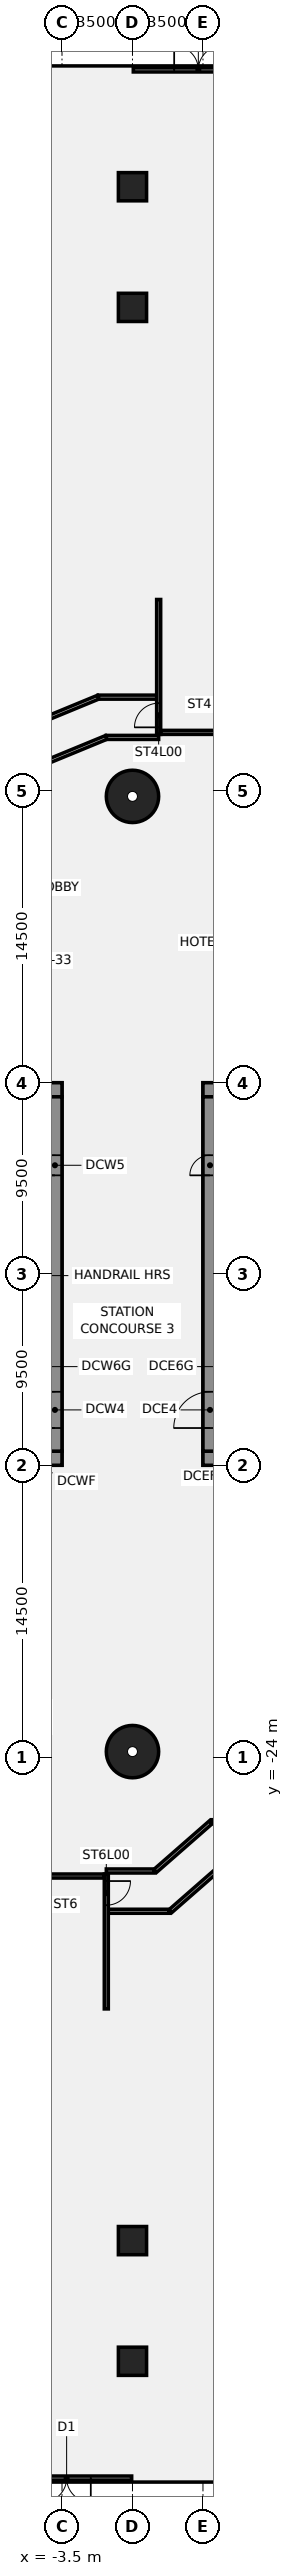
"""IFC4 building model, lengths in metres.
Left out: names, types, materials, properties, quantities, classifications, styles, units other than length and angle.
Written with IfcOpenShell. Run it as: python <this file> out.ifc"""

import sys

from ifc_helpers import new_model, si_unit, direction, frame, frame_2d, origin, origin_2d, place, context, subcontext, project, spatial, polyline, rectangle, circle, outline, extrude, element, fill, save


model = new_model("IFC4")
c1 = context("Model", 3, precision=1e-05, world=origin(), true_north=direction((0.0, 1.0)))
c2 = subcontext(c1, "Body", "Model", "MODEL_VIEW")
j1 = project(units=[si_unit("LENGTHUNIT", "METRE"), si_unit("PLANEANGLEUNIT", "RADIAN")], contexts=[c1])
p1 = place(None, origin())
s1 = spatial("IfcSite", under=j1, at=p1, CompositionType="ELEMENT")
p2 = place(p1, origin())
s2 = spatial("IfcBuilding", under=s1, at=p2, CompositionType="ELEMENT")
p3 = place(p2, origin())
s3 = spatial("IfcBuildingStorey", under=s2, at=p3, CompositionType="ELEMENT", Elevation=0.0)
for number, where, z_axis, x_axis in (
    (1, (0.0, 23.721, -0.55), (0.0, 0.0, 1.0), (1.0, 0.0, 0.0)),
    (2, (0.0, -23.721, -0.55), (0.0, 0.0, 1.0), (1.0, 0.0, 0.0)),
):
    element("IfcColumn", number, at=place(p3, frame(where, z_axis=z_axis, x_axis=x_axis)), inside=s3, PredefinedType="COLUMN", context=c2, shape_type="SweptSolid", body=[
        extrude(circle(Radius=1.3, at=origin_2d()), origin(), (0.0, 0.0, 1.0), 9.05),
    ])
for number, where, z_axis, x_axis in (
    (3, (0.0, 48.008, -0.55), (0.0, 0.0, 1.0), (1.0, 0.0, 0.0)),
    (4, (0.0, -48.008, -0.55), (0.0, 0.0, 1.0), (1.0, 0.0, 0.0)),
    (5, (0.0, -54.0, -0.55), (0.0, 0.0, 1.0), (1.0, 0.0, 0.0)),
    (6, (0.0, 54.0, -0.55), (0.0, 0.0, 1.0), (1.0, 0.0, 0.0)),
):
    element("IfcColumn", number, at=place(p3, frame(where, z_axis=z_axis, x_axis=x_axis)), inside=s3, PredefinedType="COLUMN", context=c2, shape_type="SweptSolid", body=[
        extrude(rectangle(XDim=1.4, YDim=1.4, at=origin_2d()), origin(), (0.0, 0.0, 1.0), 9.05),
    ])
p4 = place(p3, frame((1.3, 26.65, 0.0), z_axis=(0.0, 0.0, 1.0), x_axis=(-1.0, 0.0, 0.0)))
e7 = element("IfcWall", 7, at=p4, inside=s3, PredefinedType="PARTITIONING", context=c2, shape_type="SweptSolid", body=[
    extrude(rectangle(XDim=2.602, YDim=0.2, at=frame_2d((1.301, 0.0))), origin(), (0.0, 0.0, 1.0), 8.5),
])
p5 = place(p3, frame((-1.302, 26.65, 0.0), z_axis=(0.0, 0.0, 1.0), x_axis=(-0.92451250122, -0.381151721874, 0.0)))
e8 = element("IfcWall", 8, at=p5, inside=s3, PredefinedType="PARTITIONING", context=c2, shape_type="SweptSolid", body=[
    extrude(rectangle(XDim=6.171, YDim=0.2, at=frame_2d((3.085, 0.0))), origin(), (0.0, 0.0, 1.0), 8.5),
])
p6 = place(p3, frame((1.3, 28.65, 0.0), z_axis=(0.0, 0.0, 1.0), x_axis=(-1.0, 0.0, 0.0)))
e9 = element("IfcWall", 9, at=p6, inside=s3, PredefinedType="PARTITIONING", context=c2, shape_type="SweptSolid", body=[
    extrude(rectangle(XDim=2.998, YDim=0.2, at=frame_2d((1.499, 0.0))), origin(), (0.0, 0.0, 1.0), 8.5),
])
p7 = place(p3, frame((-1.698, 28.65, 0.0), z_axis=(0.0, 0.0, 1.0), x_axis=(-0.924522061362, -0.381128532198, 0.0)))
e10 = element("IfcWall", 10, at=p7, inside=s3, PredefinedType="PARTITIONING", context=c2, shape_type="SweptSolid", body=[
    extrude(rectangle(XDim=6.16, YDim=0.2, at=frame_2d((3.08, 0.0))), origin(), (0.0, 0.0, 1.0), 8.5),
])
p8 = place(p3, frame((-1.3, -29.65, 0.0), z_axis=(0.0, 0.0, 1.0), x_axis=(1.0, 0.0, 0.0)))
e11 = element("IfcWall", 11, at=p8, inside=s3, PredefinedType="PARTITIONING", context=c2, shape_type="SweptSolid", body=[
    extrude(rectangle(XDim=2.374, YDim=0.2, at=frame_2d((1.187, 0.0))), origin(), (0.0, 0.0, 1.0), 8.5),
])
p9 = place(p3, frame((1.124, -29.65, 0.0), z_axis=(0.0, 0.0, 1.0), x_axis=(0.752593197415, 0.658485747154, 0.0)))
e12 = element("IfcWall", 12, at=p9, inside=s3, PredefinedType="PARTITIONING", context=c2, shape_type="SweptSolid", body=[
    extrude(rectangle(XDim=3.666, YDim=0.2, at=frame_2d((1.833, 0.0))), origin(), (0.0, 0.0, 1.0), 8.5),
])
p10 = place(p3, frame((3.921, -27.203, 0.0), z_axis=(0.0, 0.0, 1.0), x_axis=(0.999965985762, 0.008247867521, 0.0)))
e13 = element("IfcWall", 13, at=p10, inside=s3, PredefinedType="PARTITIONING", context=c2, shape_type="SweptSolid", body=[
    extrude(rectangle(XDim=12.491, YDim=0.2, at=frame_2d((6.246, 0.0))), origin(), (0.0, 0.0, 1.0), 8.5),
])
p11 = place(p3, frame((-1.3, -31.65, 0.0), z_axis=(0.0, 0.0, 1.0), x_axis=(1.0, 0.0, 0.0)))
e14 = element("IfcWall", 14, at=p11, inside=s3, PredefinedType="PARTITIONING", context=c2, shape_type="SweptSolid", body=[
    extrude(rectangle(XDim=3.126, YDim=0.2, at=frame_2d((1.563, 0.0))), origin(), (0.0, 0.0, 1.0), 8.5),
])
p12 = place(p3, frame((1.876, -31.65, 0.0), z_axis=(0.0, 0.0, 1.0), x_axis=(0.75257257963, 0.658509310784, 0.0)))
e15 = element("IfcWall", 15, at=p12, inside=s3, PredefinedType="PARTITIONING", context=c2, shape_type="SweptSolid", body=[
    extrude(rectangle(XDim=3.675, YDim=0.2, at=frame_2d((1.838, 0.0))), origin(), (0.0, 0.0, 1.0), 8.5),
])
p13 = place(p3, frame((9.101, 59.8, 0.0), z_axis=(0.0, 0.0, 1.0), x_axis=(-1.0, 0.0, 0.0)))
e16 = element("IfcWall", 16, at=p13, inside=s3, PredefinedType="SOLIDWALL", context=c2, shape_type="SweptSolid", body=[
    extrude(rectangle(XDim=9.061, YDim=0.2, at=frame_2d((4.53, 0.0))), origin(), (0.0, 0.0, 1.0), 2.9),
])
p14 = place(p13, frame((2.03, 0.0, 0.0)))
e17 = element("IfcOpeningElement", 17, at=p14, cuts=e16, PredefinedType="OPENING", context=c2, shape_type="SweptSolid", body=[
    extrude(rectangle(XDim=2.4, YDim=2.4, at=frame_2d((1.2, 1.2))), frame((0.0, 0.11, 0.0), z_axis=(0.0, -1.0, 0.0), x_axis=(1.0, 0.0, 0.0)), (0.0, 0.0, 1.0), 0.22),
])
p15 = place(p13, frame((4.63, 0.0, 0.0)))
e18 = element("IfcOpeningElement", 18, at=p15, cuts=e16, PredefinedType="OPENING", context=c2, shape_type="SweptSolid", body=[
    extrude(rectangle(XDim=2.4, YDim=2.4, at=frame_2d((1.2, 1.2))), frame((0.0, 0.11, 0.0), z_axis=(0.0, -1.0, 0.0), x_axis=(1.0, 0.0, 0.0)), (0.0, 0.0, 1.0), 0.22),
])
p16 = place(p3, frame((-9.101, -59.8, 0.0), z_axis=(0.0, 0.0, 1.0), x_axis=(1.0, 0.0, 0.0)))
e19 = element("IfcWall", 19, at=p16, inside=s3, PredefinedType="SOLIDWALL", context=c2, shape_type="SweptSolid", body=[
    extrude(rectangle(XDim=9.061, YDim=0.2, at=frame_2d((4.53, 0.0))), origin(), (0.0, 0.0, 1.0), 2.9),
])
p17 = place(p16, frame((2.03, 0.0, 0.0)))
e20 = element("IfcOpeningElement", 20, at=p17, cuts=e19, PredefinedType="OPENING", context=c2, shape_type="SweptSolid", body=[
    extrude(rectangle(XDim=2.4, YDim=2.4, at=frame_2d((1.2, 1.2))), frame((0.0, 0.11, 0.0), z_axis=(0.0, -1.0, 0.0), x_axis=(1.0, 0.0, 0.0)), (0.0, 0.0, 1.0), 0.22),
])
p18 = place(p16, frame((4.63, 0.0, 0.0)))
e21 = element("IfcOpeningElement", 21, at=p18, cuts=e19, PredefinedType="OPENING", context=c2, shape_type="SweptSolid", body=[
    extrude(rectangle(XDim=2.4, YDim=2.4, at=frame_2d((1.2, 1.2))), frame((0.0, 0.11, 0.0), z_axis=(0.0, -1.0, 0.0), x_axis=(1.0, 0.0, 0.0)), (0.0, 0.0, 1.0), 0.22),
])
p19 = place(p3, frame((-16.5, -9.15, 0.0), z_axis=(0.0, 0.0, 1.0), x_axis=(1.0, 0.0, 0.0)))
e22 = element("IfcWall", 22, at=p19, inside=s3, PredefinedType="SHEAR", context=c2, shape_type="SweptSolid", body=[
    extrude(rectangle(XDim=13.0, YDim=0.7, at=frame_2d((6.5, 0.0))), origin(), (0.0, 0.0, 1.0), 8.5),
])
p20 = place(p19, frame((4.15, 0.0, 0.0)))
e23 = element("IfcOpeningElement", 23, at=p20, cuts=e22, PredefinedType="OPENING", context=c2, shape_type="SweptSolid", body=[
    extrude(rectangle(XDim=1.4, YDim=2.1, at=frame_2d((0.7, 1.05))), frame((0.0, 0.36, 0.0), z_axis=(0.0, -1.0, 0.0), x_axis=(1.0, 0.0, 0.0)), (0.0, 0.0, 1.0), 0.72),
])
p21 = place(p19, frame((10.125, 0.0, 0.0)))
e24 = element("IfcOpeningElement", 24, at=p21, cuts=e22, PredefinedType="OPENING", context=c2, shape_type="SweptSolid", body=[
    extrude(rectangle(XDim=1.4, YDim=2.1, at=frame_2d((0.7, 1.05))), frame((0.0, 0.36, 0.0), z_axis=(0.0, -1.0, 0.0), x_axis=(1.0, 0.0, 0.0)), (0.0, 0.0, 1.0), 0.72),
])
p22 = place(p3, frame((-16.5, 9.15, 0.0), z_axis=(0.0, 0.0, 1.0), x_axis=(1.0, 0.0, 0.0)))
e25 = element("IfcWall", 25, at=p22, inside=s3, PredefinedType="SHEAR", context=c2, shape_type="SweptSolid", body=[
    extrude(rectangle(XDim=13.0, YDim=0.7, at=frame_2d((6.5, 0.0))), origin(), (0.0, 0.0, 1.0), 8.5),
])
p23 = place(p22, frame((4.15, 0.0, 0.0)))
e26 = element("IfcOpeningElement", 26, at=p23, cuts=e25, PredefinedType="OPENING", context=c2, shape_type="SweptSolid", body=[
    extrude(rectangle(XDim=1.4, YDim=2.1, at=frame_2d((0.7, 1.05))), frame((0.0, 0.36, 0.0), z_axis=(0.0, -1.0, 0.0), x_axis=(1.0, 0.0, 0.0)), (0.0, 0.0, 1.0), 0.72),
])
p24 = place(p3, frame((-3.85, -8.8, 0.0), z_axis=(0.0, 0.0, 1.0), x_axis=(0.0, 1.0, 0.0)))
e27 = element("IfcWall", 27, at=p24, inside=s3, PredefinedType="SHEAR", context=c2, shape_type="SweptSolid", body=[
    extrude(rectangle(XDim=17.6, YDim=0.7, at=frame_2d((8.8, 0.0))), origin(), (0.0, 0.0, 1.0), 8.5),
])
p25 = place(p24, frame((1.15, 0.0, 0.0)))
e28 = element("IfcOpeningElement", 28, at=p25, cuts=e27, PredefinedType="OPENING", context=c2, shape_type="SweptSolid", body=[
    extrude(rectangle(XDim=1.8, YDim=2.1, at=frame_2d((0.9, 1.05))), frame((0.0, 0.36, 0.0), z_axis=(0.0, -1.0, 0.0), x_axis=(1.0, 0.0, 0.0)), (0.0, 0.0, 1.0), 0.72),
])
p26 = place(p24, frame((13.7, 0.0, 0.0)))
e29 = element("IfcOpeningElement", 29, at=p26, cuts=e27, PredefinedType="OPENING", context=c2, shape_type="SweptSolid", body=[
    extrude(rectangle(XDim=1.0, YDim=2.1, at=frame_2d((0.5, 1.05))), frame((0.0, 0.36, 0.0), z_axis=(0.0, -1.0, 0.0), x_axis=(1.0, 0.0, 0.0)), (0.0, 0.0, 1.0), 0.72),
])
p27 = place(p3, frame((16.5, -9.15, 0.0), z_axis=(0.0, 0.0, 1.0), x_axis=(-1.0, 0.0, 0.0)))
e30 = element("IfcWall", 30, at=p27, inside=s3, PredefinedType="SHEAR", context=c2, shape_type="SweptSolid", body=[
    extrude(rectangle(XDim=13.0, YDim=0.7, at=frame_2d((6.5, 0.0))), origin(), (0.0, 0.0, 1.0), 8.5),
])
p28 = place(p27, frame((4.15, 0.0, 0.0)))
e31 = element("IfcOpeningElement", 31, at=p28, cuts=e30, PredefinedType="OPENING", context=c2, shape_type="SweptSolid", body=[
    extrude(rectangle(XDim=1.4, YDim=2.1, at=frame_2d((0.7, 1.05))), frame((0.0, 0.36, 0.0), z_axis=(0.0, -1.0, 0.0), x_axis=(1.0, 0.0, 0.0)), (0.0, 0.0, 1.0), 0.72),
])
p29 = place(p27, frame((10.125, 0.0, 0.0)))
e32 = element("IfcOpeningElement", 32, at=p29, cuts=e30, PredefinedType="OPENING", context=c2, shape_type="SweptSolid", body=[
    extrude(rectangle(XDim=1.4, YDim=2.1, at=frame_2d((0.7, 1.05))), frame((0.0, 0.36, 0.0), z_axis=(0.0, -1.0, 0.0), x_axis=(1.0, 0.0, 0.0)), (0.0, 0.0, 1.0), 0.72),
])
p30 = place(p3, frame((16.5, 9.15, 0.0), z_axis=(0.0, 0.0, 1.0), x_axis=(-1.0, 0.0, 0.0)))
e33 = element("IfcWall", 33, at=p30, inside=s3, PredefinedType="SHEAR", context=c2, shape_type="SweptSolid", body=[
    extrude(rectangle(XDim=13.0, YDim=0.7, at=frame_2d((6.5, 0.0))), origin(), (0.0, 0.0, 1.0), 8.5),
])
p31 = place(p30, frame((4.15, 0.0, 0.0)))
e34 = element("IfcOpeningElement", 34, at=p31, cuts=e33, PredefinedType="OPENING", context=c2, shape_type="SweptSolid", body=[
    extrude(rectangle(XDim=1.4, YDim=2.1, at=frame_2d((0.7, 1.05))), frame((0.0, 0.36, 0.0), z_axis=(0.0, -1.0, 0.0), x_axis=(1.0, 0.0, 0.0)), (0.0, 0.0, 1.0), 0.72),
])
p32 = place(p3, frame((3.85, -8.8, 0.0), z_axis=(0.0, 0.0, 1.0), x_axis=(0.0, 1.0, 0.0)))
e35 = element("IfcWall", 35, at=p32, inside=s3, PredefinedType="SHEAR", context=c2, shape_type="SweptSolid", body=[
    extrude(rectangle(XDim=17.6, YDim=0.7, at=frame_2d((8.8, 0.0))), origin(), (0.0, 0.0, 1.0), 8.5),
])
p33 = place(p32, frame((1.15, 0.0, 0.0)))
e36 = element("IfcOpeningElement", 36, at=p33, cuts=e35, PredefinedType="OPENING", context=c2, shape_type="SweptSolid", body=[
    extrude(rectangle(XDim=1.8, YDim=2.1, at=frame_2d((0.9, 1.05))), frame((0.0, 0.36, 0.0), z_axis=(0.0, -1.0, 0.0), x_axis=(1.0, 0.0, 0.0)), (0.0, 0.0, 1.0), 0.72),
])
p34 = place(p32, frame((13.7, 0.0, 0.0)))
e37 = element("IfcOpeningElement", 37, at=p34, cuts=e35, PredefinedType="OPENING", context=c2, shape_type="SweptSolid", body=[
    extrude(rectangle(XDim=1.0, YDim=2.1, at=frame_2d((0.5, 1.05))), frame((0.0, 0.36, 0.0), z_axis=(0.0, -1.0, 0.0), x_axis=(1.0, 0.0, 0.0)), (0.0, 0.0, 1.0), 0.72),
])
p35 = place(p3, frame((1.3, 26.8, 0.0), z_axis=(0.0, 0.0, 1.0), x_axis=(0.0, 1.0, 0.0)))
e38 = element("IfcWall", 38, at=p35, inside=s3, PredefinedType="SHEAR", context=c2, shape_type="SweptSolid", body=[
    extrude(rectangle(XDim=6.7, YDim=0.2, at=frame_2d((3.35, 0.0))), origin(), (0.0, 0.0, 1.0), 8.5),
])
p36 = place(p35, frame((0.35, 0.0, 0.0)))
e39 = element("IfcOpeningElement", 39, at=p36, cuts=e38, PredefinedType="OPENING", context=c2, shape_type="SweptSolid", body=[
    extrude(rectangle(XDim=1.2, YDim=2.1, at=frame_2d((0.6, 1.05))), frame((0.0, 0.11, 0.0), z_axis=(0.0, -1.0, 0.0), x_axis=(1.0, 0.0, 0.0)), (0.0, 0.0, 1.0), 0.22),
])
p37 = place(p3, frame((4.6, 26.9, 0.0), z_axis=(0.0, 0.0, 1.0), x_axis=(-1.0, 0.0, 0.0)))
e40 = element("IfcWall", 40, at=p37, inside=s3, PredefinedType="SHEAR", context=c2, shape_type="SweptSolid", body=[
    extrude(rectangle(XDim=3.2, YDim=0.2, at=frame_2d((1.6, 0.0))), origin(), (0.0, 0.0, 1.0), 8.5),
])
p38 = place(p3, origin())
e41 = element("IfcWall", 41, at=p38, inside=s3, PredefinedType="SHEAR", context=c2, shape_type="SweptSolid", body=[
    extrude(outline(polyline([(4.6, 33.3), (4.6, 33.5), (1.4, 33.5), (1.4, 33.3), (4.6, 33.3)])), origin(), (0.0, 0.0, 1.0), 8.5),
])
p39 = place(p3, frame((-1.3, -29.8, 0.0), z_axis=(0.0, 0.0, 1.0), x_axis=(0.0, -1.0, 0.0)))
e42 = element("IfcWall", 42, at=p39, inside=s3, PredefinedType="SHEAR", context=c2, shape_type="SweptSolid", body=[
    extrude(rectangle(XDim=6.7, YDim=0.2, at=frame_2d((3.35, 0.0))), origin(), (0.0, 0.0, 1.0), 8.5),
])
p40 = place(p39, frame((0.35, 0.0, 0.0)))
e43 = element("IfcOpeningElement", 43, at=p40, cuts=e42, PredefinedType="OPENING", context=c2, shape_type="SweptSolid", body=[
    extrude(rectangle(XDim=1.2, YDim=2.1, at=frame_2d((0.6, 1.05))), frame((0.0, 0.11, 0.0), z_axis=(0.0, -1.0, 0.0), x_axis=(1.0, 0.0, 0.0)), (0.0, 0.0, 1.0), 0.22),
])
p41 = place(p3, frame((-4.6, -29.9, 0.0), z_axis=(0.0, 0.0, 1.0), x_axis=(1.0, 0.0, 0.0)))
e44 = element("IfcWall", 44, at=p41, inside=s3, PredefinedType="SHEAR", context=c2, shape_type="SweptSolid", body=[
    extrude(rectangle(XDim=3.2, YDim=0.2, at=frame_2d((1.6, 0.0))), origin(), (0.0, 0.0, 1.0), 8.5),
])
p42 = place(p3, origin())
e45 = element("IfcWall", 45, at=p42, inside=s3, PredefinedType="SHEAR", context=c2, shape_type="SweptSolid", body=[
    extrude(outline(polyline([(-4.6, -36.3), (-4.6, -36.5), (-1.4, -36.5), (-1.4, -36.3), (-4.6, -36.3)])), origin(), (0.0, 0.0, 1.0), 8.5),
])
p43 = place(p15, frame((2.4, 0.0, 0.0), z_axis=(0.0, 0.0, 1.0), x_axis=(-1.0, 0.0, 0.0)))
e46 = element("IfcDoor", 46, at=p43, inside=s3, OperationType="DOUBLE_DOOR_DOUBLE_SWING", PredefinedType="DOOR", context=c2, shape_type="SweptSolid", body=[
    extrude(rectangle(XDim=2.4, YDim=2.4, at=frame_2d((1.2, 1.2))), frame((0.0, 0.025, 0.0), z_axis=(0.0, -1.0, 0.0), x_axis=(1.0, 0.0, 0.0)), (0.0, 0.0, 1.0), 0.05),
])
fill(e18, e46)
p44 = place(p18, frame((2.4, 0.0, 0.0), z_axis=(0.0, 0.0, 1.0), x_axis=(-1.0, 0.0, 0.0)))
e47 = element("IfcDoor", 47, at=p44, inside=s3, OperationType="DOUBLE_DOOR_DOUBLE_SWING", PredefinedType="DOOR", context=c2, shape_type="SweptSolid", body=[
    extrude(rectangle(XDim=2.4, YDim=2.4, at=frame_2d((1.2, 1.2))), frame((0.0, 0.025, 0.0), z_axis=(0.0, -1.0, 0.0), x_axis=(1.0, 0.0, 0.0)), (0.0, 0.0, 1.0), 0.05),
])
fill(e21, e47)
p45 = place(p25, origin())
e48 = element("IfcDoor", 48, at=p45, inside=s3, OperationType="SINGLE_SWING_LEFT", PredefinedType="DOOR", context=c2, shape_type="SweptSolid", body=[
    extrude(rectangle(XDim=1.8, YDim=2.1, at=frame_2d((0.9, 1.05))), frame((0.0, 0.025, 0.0), z_axis=(0.0, -1.0, 0.0), x_axis=(1.0, 0.0, 0.0)), (0.0, 0.0, 1.0), 0.05),
])
fill(e28, e48)
p46 = place(p26, origin())
e49 = element("IfcDoor", 49, at=p46, inside=s3, OperationType="SINGLE_SWING_LEFT", PredefinedType="DOOR", context=c2, shape_type="SweptSolid", body=[
    extrude(rectangle(XDim=1.0, YDim=2.1, at=frame_2d((0.5, 1.05))), frame((0.0, 0.025, 0.0), z_axis=(0.0, -1.0, 0.0), x_axis=(1.0, 0.0, 0.0)), (0.0, 0.0, 1.0), 0.05),
])
fill(e29, e49)
p47 = place(p33, origin())
e50 = element("IfcDoor", 50, at=p47, inside=s3, OperationType="SINGLE_SWING_LEFT", PredefinedType="DOOR", context=c2, shape_type="SweptSolid", body=[
    extrude(rectangle(XDim=1.8, YDim=2.1, at=frame_2d((0.9, 1.05))), frame((0.0, 0.025, 0.0), z_axis=(0.0, -1.0, 0.0), x_axis=(1.0, 0.0, 0.0)), (0.0, 0.0, 1.0), 0.05),
])
fill(e36, e50)
p48 = place(p34, origin())
e51 = element("IfcDoor", 51, at=p48, inside=s3, OperationType="SINGLE_SWING_LEFT", PredefinedType="DOOR", context=c2, shape_type="SweptSolid", body=[
    extrude(rectangle(XDim=1.0, YDim=2.1, at=frame_2d((0.5, 1.05))), frame((0.0, 0.025, 0.0), z_axis=(0.0, -1.0, 0.0), x_axis=(1.0, 0.0, 0.0)), (0.0, 0.0, 1.0), 0.05),
])
fill(e37, e51)
p49 = place(p36, origin())
e52 = element("IfcDoor", 52, at=p49, inside=s3, OperationType="SINGLE_SWING_LEFT", PredefinedType="DOOR", context=c2, shape_type="SweptSolid", body=[
    extrude(rectangle(XDim=1.2, YDim=2.1, at=frame_2d((0.6, 1.05))), frame((0.0, 0.025, 0.0), z_axis=(0.0, -1.0, 0.0), x_axis=(1.0, 0.0, 0.0)), (0.0, 0.0, 1.0), 0.05),
])
fill(e39, e52)
p50 = place(p40, origin())
e53 = element("IfcDoor", 53, at=p50, inside=s3, OperationType="SINGLE_SWING_LEFT", PredefinedType="DOOR", context=c2, shape_type="SweptSolid", body=[
    extrude(rectangle(XDim=1.2, YDim=2.1, at=frame_2d((0.6, 1.05))), frame((0.0, 0.025, 0.0), z_axis=(0.0, -1.0, 0.0), x_axis=(1.0, 0.0, 0.0)), (0.0, 0.0, 1.0), 0.05),
])
fill(e43, e53)
save(model, sys.argv[1])
